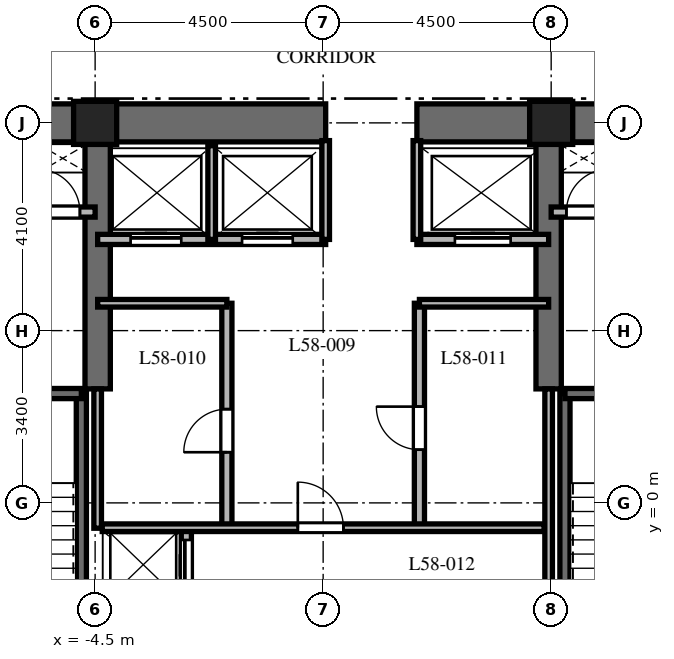
"""IFC4 building model, lengths in metres.
Left out: names, types, materials, properties, quantities, classifications, styles, units other than length and angle.
Written with IfcOpenShell. Run it as: python <this file> out.ifc"""

import sys

from ifc_helpers import new_model, si_unit, direction, frame, frame_2d, origin, origin_2d, place, context, subcontext, project, spatial, rectangle, extrude, element, fill, save


model = new_model("IFC4")
c1 = context("Model", 3, precision=1e-05, world=origin(), true_north=direction((0.0, 1.0)))
c2 = subcontext(c1, "Body", "Model", "MODEL_VIEW")
j1 = project(units=[si_unit("LENGTHUNIT", "METRE"), si_unit("PLANEANGLEUNIT", "RADIAN")], contexts=[c1])
p1 = place(None, origin())
s1 = spatial("IfcSite", under=j1, at=p1, CompositionType="ELEMENT")
p2 = place(p1, origin())
s2 = spatial("IfcBuilding", under=s1, at=p2, CompositionType="ELEMENT")
p3 = place(p2, frame((0.0, 0.0, 233.1)))
s3 = spatial("IfcBuildingStorey", under=s2, at=p3, CompositionType="ELEMENT", Elevation=233.1)
p4 = place(p3, frame((-9.375, 7.5, 0.0), z_axis=(0.0, 0.0, 1.0), x_axis=(1.0, 0.0, 0.0)))
e1 = element("IfcWall", 1, at=p4, inside=s3, PredefinedType="SHEAR", context=c2, shape_type="SweptSolid", body=[
    extrude(rectangle(XDim=9.425, YDim=0.75, at=frame_2d((4.712, 0.0))), origin(), (0.0, 0.0, 1.0), 3.8),
])
p5 = place(p3, frame((1.85, 7.5, 0.0), z_axis=(0.0, 0.0, 1.0), x_axis=(1.0, 0.0, 0.0)))
e2 = element("IfcWall", 2, at=p5, inside=s3, PredefinedType="SHEAR", context=c2, shape_type="SweptSolid", body=[
    extrude(rectangle(XDim=7.525, YDim=0.75, at=frame_2d((3.762, 0.0))), origin(), (0.0, 0.0, 1.0), 3.8),
])
for number, where, z_axis, x_axis in (
    (3, (-4.45, 2.25, 0.0), (0.0, 0.0, 1.0), (0.0, 1.0, 0.0)),
    (4, (4.45, 2.25, 0.0), (0.0, 0.0, 1.0), (0.0, 1.0, 0.0)),
):
    element("IfcWall", number, at=place(p3, frame(where, z_axis=z_axis, x_axis=x_axis)), inside=s3, PredefinedType="SHEAR", context=c2, shape_type="SweptSolid", body=[
        extrude(rectangle(XDim=4.875, YDim=0.5, at=frame_2d((2.438, 0.0))), origin(), (0.0, 0.0, 1.0), 3.8),
    ])
p6 = place(p3, frame((-4.772, -6.985, 0.0), z_axis=(0.0, 0.0, 1.0), x_axis=(0.0, 1.0, 0.0)))
e5 = element("IfcWall", 5, at=p6, inside=s3, PredefinedType="SHEAR", context=c2, shape_type="SweptSolid", body=[
    extrude(rectangle(XDim=9.143, YDim=0.2, at=frame_2d((4.572, 0.0))), origin(), (0.0, 0.0, 1.0), 3.8),
])
p7 = place(p3, frame((-8.458, 2.158, 0.0), z_axis=(0.0, 0.0, 1.0), x_axis=(1.0, 0.0, 0.0)))
e6 = element("IfcWall", 6, at=p7, inside=s3, PredefinedType="SHEAR", context=c2, shape_type="SweptSolid", body=[
    extrude(rectangle(XDim=3.686, YDim=0.2, at=frame_2d((1.843, 0.0))), origin(), (0.0, 0.0, 1.0), 3.8),
])
p8 = place(p7, frame((1.3, 0.0, 0.0)))
e7 = element("IfcOpeningElement", 7, at=p8, cuts=e6, PredefinedType="OPENING", context=c2, shape_type="SweptSolid", body=[
    extrude(rectangle(XDim=1.0, YDim=2.15, at=frame_2d((0.5, 1.075))), frame((0.0, 0.11, 0.0), z_axis=(0.0, -1.0, 0.0), x_axis=(1.0, 0.0, 0.0)), (0.0, 0.0, 1.0), 0.22),
])
p9 = place(p3, frame((4.772, -6.985, 0.0), z_axis=(0.0, 0.0, 1.0), x_axis=(0.0, 1.0, 0.0)))
e8 = element("IfcWall", 8, at=p9, inside=s3, PredefinedType="SHEAR", context=c2, shape_type="SweptSolid", body=[
    extrude(rectangle(XDim=9.143, YDim=0.2, at=frame_2d((4.572, 0.0))), origin(), (0.0, 0.0, 1.0), 3.8),
])
p10 = place(p3, frame((4.772, 2.158, 0.0), z_axis=(0.0, 0.0, 1.0), x_axis=(1.0, 0.0, 0.0)))
e9 = element("IfcWall", 9, at=p10, inside=s3, PredefinedType="SHEAR", context=c2, shape_type="SweptSolid", body=[
    extrude(rectangle(XDim=3.686, YDim=0.2, at=frame_2d((1.843, 0.0))), origin(), (0.0, 0.0, 1.0), 3.8),
])
p11 = place(p10, frame((1.35, 0.0, 0.0)))
e10 = element("IfcOpeningElement", 10, at=p11, cuts=e9, PredefinedType="OPENING", context=c2, shape_type="SweptSolid", body=[
    extrude(rectangle(XDim=1.0, YDim=2.15, at=frame_2d((0.5, 1.075))), frame((0.0, 0.11, 0.0), z_axis=(0.0, -1.0, 0.0), x_axis=(1.0, 0.0, 0.0)), (0.0, 0.0, 1.0), 0.22),
])
for number, where, z_axis, x_axis in (
    (11, (4.5, 7.5, 0.0), (0.0, 0.0, 1.0), (1.0, 0.0, 0.0)),
    (12, (-4.5, 7.5, 0.0), (0.0, 0.0, 1.0), (1.0, 0.0, 0.0)),
):
    element("IfcColumn", number, at=place(p3, frame(where, z_axis=z_axis, x_axis=x_axis)), inside=s3, PredefinedType="COLUMN", context=c2, shape_type="SweptSolid", body=[
        extrude(rectangle(XDim=0.85, YDim=0.85, at=origin_2d()), origin(), (0.0, 0.0, 1.0), 3.8),
    ])
p12 = place(p3, frame((-8.55, 5.74, 0.0), z_axis=(0.0, 0.0, 1.0), x_axis=(1.0, 0.0, 0.0)))
e13 = element("IfcWall", 13, at=p12, inside=s3, PredefinedType="PARTITIONING", context=c2, shape_type="SweptSolid", body=[
    extrude(rectangle(XDim=4.05, YDim=0.2, at=frame_2d((2.025, 0.0))), origin(), (0.0, 0.0, 1.0), 3.5),
])
p13 = place(p12, frame((0.75, 0.0, 0.0)))
e14 = element("IfcOpeningElement", 14, at=p13, cuts=e13, PredefinedType="OPENING", context=c2, shape_type="SweptSolid", body=[
    extrude(rectangle(XDim=1.1, YDim=2.2, at=frame_2d((0.55, 1.1))), frame((0.0, 0.11, 0.0), z_axis=(0.0, -1.0, 0.0), x_axis=(1.0, 0.0, 0.0)), (0.0, 0.0, 1.0), 0.22),
])
p14 = place(p12, frame((2.9, 0.0, 0.0)))
e15 = element("IfcOpeningElement", 15, at=p14, cuts=e13, PredefinedType="OPENING", context=c2, shape_type="SweptSolid", body=[
    extrude(rectangle(XDim=0.85, YDim=2.03, at=frame_2d((0.425, 1.015))), frame((0.0, 0.11, 0.0), z_axis=(0.0, -1.0, 0.0), x_axis=(1.0, 0.0, 0.0)), (0.0, 0.0, 1.0), 0.22),
])
p15 = place(p3, frame((4.5, 5.74, 0.0), z_axis=(0.0, 0.0, 1.0), x_axis=(1.0, 0.0, 0.0)))
e16 = element("IfcWall", 16, at=p15, inside=s3, PredefinedType="PARTITIONING", context=c2, shape_type="SweptSolid", body=[
    extrude(rectangle(XDim=4.05, YDim=0.2, at=frame_2d((2.025, 0.0))), origin(), (0.0, 0.0, 1.0), 3.5),
])
p16 = place(p15, frame((0.3, 0.0, 0.0)))
e17 = element("IfcOpeningElement", 17, at=p16, cuts=e16, PredefinedType="OPENING", context=c2, shape_type="SweptSolid", body=[
    extrude(rectangle(XDim=0.85, YDim=2.03, at=frame_2d((0.425, 1.015))), frame((0.0, 0.11, 0.0), z_axis=(0.0, -1.0, 0.0), x_axis=(1.0, 0.0, 0.0)), (0.0, 0.0, 1.0), 0.22),
])
p17 = place(p15, frame((2.15, 0.0, 0.0)))
e18 = element("IfcOpeningElement", 18, at=p17, cuts=e16, PredefinedType="OPENING", context=c2, shape_type="SweptSolid", body=[
    extrude(rectangle(XDim=1.1, YDim=2.2, at=frame_2d((0.55, 1.1))), frame((0.0, 0.11, 0.0), z_axis=(0.0, -1.0, 0.0), x_axis=(1.0, 0.0, 0.0)), (0.0, 0.0, 1.0), 0.22),
])
p18 = place(p3, frame((-2.7, -1.972, 0.0), z_axis=(0.0, 0.0, 1.0), x_axis=(0.0, 1.0, 0.0)))
e19 = element("IfcWall", 19, at=p18, inside=s3, PredefinedType="PARTITIONING", context=c2, shape_type="SweptSolid", body=[
    extrude(rectangle(XDim=1.472, YDim=0.2, at=frame_2d((0.736, 0.0))), origin(), (0.0, 0.0, 1.0), 3.5),
])
p19 = place(p18, frame((0.24, 0.0, 0.0)))
e20 = element("IfcOpeningElement", 20, at=p19, cuts=e19, PredefinedType="OPENING", context=c2, shape_type="SweptSolid", body=[
    extrude(rectangle(XDim=1.0, YDim=2.2, at=frame_2d((0.5, 1.1))), frame((0.0, 0.11, 0.0), z_axis=(0.0, -1.0, 0.0), x_axis=(1.0, 0.0, 0.0)), (0.0, 0.0, 1.0), 0.22),
])
p20 = place(p3, frame((-4.45, 5.2, 0.0), z_axis=(0.0, 0.0, 1.0), x_axis=(1.0, 0.0, 0.0)))
e21 = element("IfcWall", 21, at=p20, inside=s3, PredefinedType="PARTITIONING", context=c2, shape_type="SweptSolid", body=[
    extrude(rectangle(XDim=4.5, YDim=0.2, at=frame_2d((2.25, 0.0))), origin(), (0.0, 0.0, 1.0), 3.5),
])
p21 = place(p20, frame((0.65, 0.0, 0.0)))
e22 = element("IfcOpeningElement", 22, at=p21, cuts=e21, PredefinedType="OPENING", context=c2, shape_type="SweptSolid", body=[
    extrude(rectangle(XDim=1.0, YDim=2.2, at=frame_2d((0.5, 1.1))), frame((0.0, 0.11, 0.0), z_axis=(0.0, -1.0, 0.0), x_axis=(1.0, 0.0, 0.0)), (0.0, 0.0, 1.0), 0.22),
])
p22 = place(p20, frame((2.85, 0.0, 0.0)))
e23 = element("IfcOpeningElement", 23, at=p22, cuts=e21, PredefinedType="OPENING", context=c2, shape_type="SweptSolid", body=[
    extrude(rectangle(XDim=1.0, YDim=2.2, at=frame_2d((0.5, 1.1))), frame((0.0, 0.11, 0.0), z_axis=(0.0, -1.0, 0.0), x_axis=(1.0, 0.0, 0.0)), (0.0, 0.0, 1.0), 0.22),
])
p23 = place(p3, frame((1.85, 5.2, 0.0), z_axis=(0.0, 0.0, 1.0), x_axis=(1.0, 0.0, 0.0)))
e24 = element("IfcWall", 24, at=p23, inside=s3, PredefinedType="PARTITIONING", context=c2, shape_type="SweptSolid", body=[
    extrude(rectangle(XDim=2.6, YDim=0.2, at=frame_2d((1.3, 0.0))), origin(), (0.0, 0.0, 1.0), 3.5),
])
p24 = place(p23, frame((0.75, 0.0, 0.0)))
e25 = element("IfcOpeningElement", 25, at=p24, cuts=e24, PredefinedType="OPENING", context=c2, shape_type="SweptSolid", body=[
    extrude(rectangle(XDim=1.1, YDim=2.2, at=frame_2d((0.55, 1.1))), frame((0.0, 0.11, 0.0), z_axis=(0.0, -1.0, 0.0), x_axis=(1.0, 0.0, 0.0)), (0.0, 0.0, 1.0), 0.22),
])
p25 = place(p3, frame((-2.2, 5.2, 0.0), z_axis=(0.0, 0.0, 1.0), x_axis=(0.0, 1.0, 0.0)))
e26 = element("IfcWall", 26, at=p25, inside=s3, PredefinedType="PARTITIONING", context=c2, shape_type="SweptSolid", body=[
    extrude(rectangle(XDim=1.85, YDim=0.15, at=frame_2d((0.925, 0.0))), origin(), (0.0, 0.0, 1.0), 3.5),
])
for number, where, z_axis, x_axis in (
    (27, (0.05, 5.2, 0.0), (0.0, 0.0, 1.0), (0.0, 1.0, 0.0)),
    (28, (1.85, 5.2, 0.0), (0.0, 0.0, 1.0), (0.0, 1.0, 0.0)),
):
    element("IfcWall", number, at=place(p3, frame(where, z_axis=z_axis, x_axis=x_axis)), inside=s3, PredefinedType="PARTITIONING", context=c2, shape_type="SweptSolid", body=[
        extrude(rectangle(XDim=1.95, YDim=0.15, at=frame_2d((0.975, 0.0))), origin(), (0.0, 0.0, 1.0), 3.5),
    ])
p26 = place(p3, frame((-4.45, -0.5, 0.0), z_axis=(0.0, 0.0, 1.0), x_axis=(0.0, 1.0, 0.0)))
e29 = element("IfcWall", 29, at=p26, inside=s3, PredefinedType="PARTITIONING", context=c2, shape_type="SweptSolid", body=[
    extrude(rectangle(XDim=2.75, YDim=0.15, at=frame_2d((1.375, 0.0))), origin(), (0.0, 0.0, 1.0), 3.5),
])
p27 = place(p3, frame((4.45, -1.972, 0.0), z_axis=(0.0, 0.0, 1.0), x_axis=(0.0, 1.0, 0.0)))
e30 = element("IfcWall", 30, at=p27, inside=s3, PredefinedType="PARTITIONING", context=c2, shape_type="SweptSolid", body=[
    extrude(rectangle(XDim=4.222, YDim=0.15, at=frame_2d((2.111, 0.0))), origin(), (0.0, 0.0, 1.0), 3.5),
])
p28 = place(p3, frame((-1.9, -0.5, 0.0), z_axis=(0.0, 0.0, 1.0), x_axis=(0.0, 1.0, 0.0)))
e31 = element("IfcWall", 31, at=p28, inside=s3, PredefinedType="PARTITIONING", context=c2, shape_type="SweptSolid", body=[
    extrude(rectangle(XDim=4.44, YDim=0.2, at=frame_2d((2.22, 0.0))), origin(), (0.0, 0.0, 1.0), 3.5),
])
p29 = place(p28, frame((1.5, 0.0, 0.0)))
e32 = element("IfcOpeningElement", 32, at=p29, cuts=e31, PredefinedType="OPENING", context=c2, shape_type="SweptSolid", body=[
    extrude(rectangle(XDim=0.85, YDim=2.03, at=frame_2d((0.425, 1.015))), frame((0.0, 0.11, 0.0), z_axis=(0.0, -1.0, 0.0), x_axis=(1.0, 0.0, 0.0)), (0.0, 0.0, 1.0), 0.22),
])
p30 = place(p3, frame((-4.45, 3.94, 0.0), z_axis=(0.0, 0.0, 1.0), x_axis=(1.0, 0.0, 0.0)))
e33 = element("IfcWall", 33, at=p30, inside=s3, PredefinedType="PARTITIONING", context=c2, shape_type="SweptSolid", body=[
    extrude(rectangle(XDim=2.55, YDim=0.15, at=frame_2d((1.275, 0.0))), origin(), (0.0, 0.0, 1.0), 3.5),
])
p31 = place(p3, frame((1.9, -0.5, 0.0), z_axis=(0.0, 0.0, 1.0), x_axis=(0.0, 1.0, 0.0)))
e34 = element("IfcWall", 34, at=p31, inside=s3, PredefinedType="PARTITIONING", context=c2, shape_type="SweptSolid", body=[
    extrude(rectangle(XDim=4.44, YDim=0.2, at=frame_2d((2.22, 0.0))), origin(), (0.0, 0.0, 1.0), 3.5),
])
p32 = place(p31, frame((1.55, 0.0, 0.0)))
e35 = element("IfcOpeningElement", 35, at=p32, cuts=e34, PredefinedType="OPENING", context=c2, shape_type="SweptSolid", body=[
    extrude(rectangle(XDim=0.85, YDim=2.03, at=frame_2d((0.425, 1.015))), frame((0.0, 0.11, 0.0), z_axis=(0.0, -1.0, 0.0), x_axis=(1.0, 0.0, 0.0)), (0.0, 0.0, 1.0), 0.22),
])
p33 = place(p3, frame((1.9, 3.94, 0.0), z_axis=(0.0, 0.0, 1.0), x_axis=(1.0, 0.0, 0.0)))
e36 = element("IfcWall", 36, at=p33, inside=s3, PredefinedType="PARTITIONING", context=c2, shape_type="SweptSolid", body=[
    extrude(rectangle(XDim=2.55, YDim=0.15, at=frame_2d((1.275, 0.0))), origin(), (0.0, 0.0, 1.0), 3.5),
])
p34 = place(p3, frame((-4.36, -0.49, 0.0), z_axis=(0.0, 0.0, 1.0), x_axis=(1.0, 0.0, 0.0)))
e37 = element("IfcWall", 37, at=p34, inside=s3, PredefinedType="PARTITIONING", context=c2, shape_type="SweptSolid", body=[
    extrude(rectangle(XDim=8.72, YDim=0.15, at=frame_2d((4.36, 0.0))), origin(), (0.0, 0.0, 1.0), 3.5),
])
p35 = place(p34, frame((3.86, 0.0, 0.0)))
e38 = element("IfcOpeningElement", 38, at=p35, cuts=e37, PredefinedType="OPENING", context=c2, shape_type="SweptSolid", body=[
    extrude(rectangle(XDim=0.9, YDim=2.03, at=frame_2d((0.45, 1.015))), frame((0.0, 0.085, 0.0), z_axis=(0.0, -1.0, 0.0), x_axis=(1.0, 0.0, 0.0)), (0.0, 0.0, 1.0), 0.17),
])
p36 = place(p14, origin())
e39 = element("IfcDoor", 39, at=p36, inside=s3, OperationType="SINGLE_SWING_LEFT", PredefinedType="DOOR", context=c2, shape_type="SweptSolid", body=[
    extrude(rectangle(XDim=0.85, YDim=2.03, at=frame_2d((0.425, 1.015))), frame((0.0, 0.025, 0.0), z_axis=(0.0, -1.0, 0.0), x_axis=(1.0, 0.0, 0.0)), (0.0, 0.0, 1.0), 0.05),
])
fill(e15, e39)
p37 = place(p16, origin())
e40 = element("IfcDoor", 40, at=p37, inside=s3, OperationType="SINGLE_SWING_RIGHT", PredefinedType="DOOR", context=c2, shape_type="SweptSolid", body=[
    extrude(rectangle(XDim=0.85, YDim=2.03, at=frame_2d((0.425, 1.015))), frame((0.0, 0.025, 0.0), z_axis=(0.0, -1.0, 0.0), x_axis=(1.0, 0.0, 0.0)), (0.0, 0.0, 1.0), 0.05),
])
fill(e17, e40)
p38 = place(p19, origin())
e41 = element("IfcDoor", 41, at=p38, inside=s3, OperationType="SLIDING_TO_LEFT", PredefinedType="DOOR", context=c2, shape_type="SweptSolid", body=[
    extrude(rectangle(XDim=1.0, YDim=2.2, at=frame_2d((0.5, 1.1))), frame((0.0, 0.025, 0.0), z_axis=(0.0, -1.0, 0.0), x_axis=(1.0, 0.0, 0.0)), (0.0, 0.0, 1.0), 0.05),
])
fill(e20, e41)
p39 = place(p21, origin())
e42 = element("IfcDoor", 42, at=p39, inside=s3, OperationType="SLIDING_TO_LEFT", PredefinedType="DOOR", context=c2, shape_type="SweptSolid", body=[
    extrude(rectangle(XDim=1.0, YDim=2.2, at=frame_2d((0.5, 1.1))), frame((0.0, 0.025, 0.0), z_axis=(0.0, -1.0, 0.0), x_axis=(1.0, 0.0, 0.0)), (0.0, 0.0, 1.0), 0.05),
])
fill(e22, e42)
p40 = place(p22, origin())
e43 = element("IfcDoor", 43, at=p40, inside=s3, OperationType="SLIDING_TO_RIGHT", PredefinedType="DOOR", context=c2, shape_type="SweptSolid", body=[
    extrude(rectangle(XDim=1.0, YDim=2.2, at=frame_2d((0.5, 1.1))), frame((0.0, 0.025, 0.0), z_axis=(0.0, -1.0, 0.0), x_axis=(1.0, 0.0, 0.0)), (0.0, 0.0, 1.0), 0.05),
])
fill(e23, e43)
p41 = place(p24, origin())
e44 = element("IfcDoor", 44, at=p41, inside=s3, OperationType="SLIDING_TO_RIGHT", PredefinedType="DOOR", context=c2, shape_type="SweptSolid", body=[
    extrude(rectangle(XDim=1.1, YDim=2.2, at=frame_2d((0.55, 1.1))), frame((0.0, 0.025, 0.0), z_axis=(0.0, -1.0, 0.0), x_axis=(1.0, 0.0, 0.0)), (0.0, 0.0, 1.0), 0.05),
])
fill(e25, e44)
p42 = place(p29, origin())
e45 = element("IfcDoor", 45, at=p42, inside=s3, OperationType="SINGLE_SWING_LEFT", PredefinedType="DOOR", context=c2, shape_type="SweptSolid", body=[
    extrude(rectangle(XDim=0.85, YDim=2.03, at=frame_2d((0.425, 1.015))), frame((0.0, 0.025, 0.0), z_axis=(0.0, -1.0, 0.0), x_axis=(1.0, 0.0, 0.0)), (0.0, 0.0, 1.0), 0.05),
])
fill(e32, e45)
p43 = place(p32, origin())
e46 = element("IfcDoor", 46, at=p43, inside=s3, OperationType="SINGLE_SWING_RIGHT", PredefinedType="DOOR", context=c2, shape_type="SweptSolid", body=[
    extrude(rectangle(XDim=0.85, YDim=2.03, at=frame_2d((0.425, 1.015))), frame((0.0, 0.025, 0.0), z_axis=(0.0, -1.0, 0.0), x_axis=(1.0, 0.0, 0.0)), (0.0, 0.0, 1.0), 0.05),
])
fill(e35, e46)
p44 = place(p35, origin())
e47 = element("IfcDoor", 47, at=p44, inside=s3, OperationType="SINGLE_SWING_LEFT", PredefinedType="DOOR", context=c2, shape_type="SweptSolid", body=[
    extrude(rectangle(XDim=0.9, YDim=2.03, at=frame_2d((0.45, 1.015))), frame((0.0, 0.025, 0.0), z_axis=(0.0, -1.0, 0.0), x_axis=(1.0, 0.0, 0.0)), (0.0, 0.0, 1.0), 0.05),
])
fill(e38, e47)
save(model, sys.argv[1])
